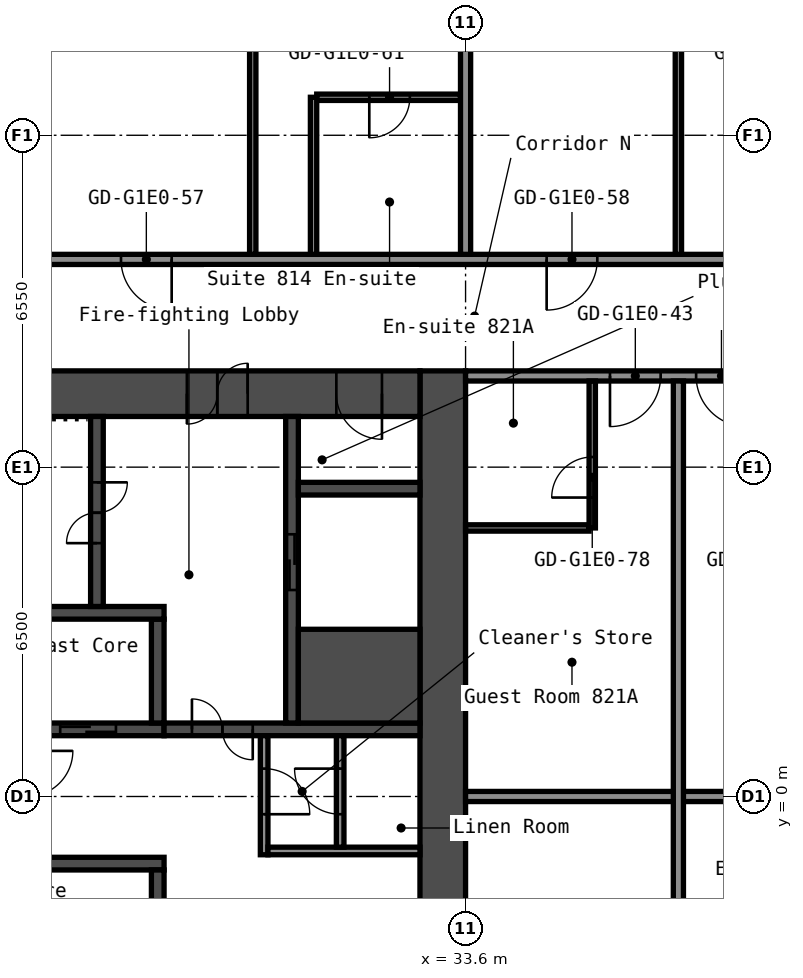
"""IFC4 building model, lengths in metres.
Left out: names, types, materials, properties, quantities, classifications, styles, units other than length and angle.
Written with IfcOpenShell. Run it as: python <this file> out.ifc"""

import sys

from ifc_helpers import new_model, si_unit, direction, frame, frame_2d, origin, place, context, subcontext, project, spatial, rectangle, extrude, element, fill, save


model = new_model("IFC4")
c1 = context("Model", 3, precision=1e-05, world=origin(), true_north=direction((0.0, 1.0)))
c2 = subcontext(c1, "Body", "Model", "MODEL_VIEW")
j1 = project(units=[si_unit("LENGTHUNIT", "METRE"), si_unit("PLANEANGLEUNIT", "RADIAN")], contexts=[c1])
p1 = place(None, origin())
s1 = spatial("IfcSite", under=j1, at=p1, CompositionType="ELEMENT")
p2 = place(p1, origin())
s2 = spatial("IfcBuilding", under=s1, at=p2, CompositionType="ELEMENT")
p3 = place(p2, frame((0.0, 0.0, 32.6)))
s3 = spatial("IfcBuildingStorey", under=s2, at=p3, CompositionType="ELEMENT", Elevation=32.6)
p4 = place(p3, frame((33.15, -8.4, 0.0), z_axis=(0.0, 0.0, 1.0), x_axis=(0.0, 1.0, 0.0)))
e1 = element("IfcWall", 1, at=p4, inside=s3, PredefinedType="SHEAR", context=c2, shape_type="SweptSolid", body=[
    extrude(rectangle(XDim=16.8, YDim=0.9, at=frame_2d((8.4, 0.0))), origin(), (0.0, 0.0, 1.0), 2.8),
])
p5 = place(p3, frame((17.7, 7.95, 0.0), z_axis=(0.0, 0.0, 1.0), x_axis=(1.0, 0.0, 0.0)))
e2 = element("IfcWall", 2, at=p5, inside=s3, PredefinedType="SHEAR", context=c2, shape_type="SweptSolid", body=[
    extrude(rectangle(XDim=15.0, YDim=0.9, at=frame_2d((7.5, 0.0))), origin(), (0.0, 0.0, 1.0), 2.8),
])
p6 = place(p5, frame((10.4, 0.0, 0.0)))
e3 = element("IfcOpeningElement", 3, at=p6, cuts=e2, PredefinedType="OPENING", context=c2, shape_type="SweptSolid", body=[
    extrude(rectangle(XDim=1.2, YDim=2.1, at=frame_2d((0.6, 1.05))), frame((0.0, 0.46, 0.0), z_axis=(0.0, -1.0, 0.0), x_axis=(1.0, 0.0, 0.0)), (0.0, 0.0, 1.0), 0.92),
])
p7 = place(p5, frame((13.35, 0.0, 0.0)))
e4 = element("IfcOpeningElement", 4, at=p7, cuts=e2, PredefinedType="OPENING", context=c2, shape_type="SweptSolid", body=[
    extrude(rectangle(XDim=0.9, YDim=2.1, at=frame_2d((0.45, 1.05))), frame((0.0, 0.46, 0.0), z_axis=(0.0, -1.0, 0.0), x_axis=(1.0, 0.0, 0.0)), (0.0, 0.0, 1.0), 0.92),
])
p8 = place(p3, frame((20.15, 1.325, 0.0), z_axis=(0.0, 0.0, 1.0), x_axis=(1.0, 0.0, 0.0)))
e5 = element("IfcWall", 5, at=p8, inside=s3, PredefinedType="SHEAR", context=c2, shape_type="SweptSolid", body=[
    extrude(rectangle(XDim=7.5, YDim=0.25, at=frame_2d((3.75, 0.0))), origin(), (0.0, 0.0, 1.0), 2.8),
])
p9 = place(p8, frame((0.65, 0.0, 0.0)))
e6 = element("IfcOpeningElement", 6, at=p9, cuts=e5, PredefinedType="OPENING", context=c2, shape_type="SweptSolid", body=[
    extrude(rectangle(XDim=1.1, YDim=2.1, at=frame_2d((0.55, 1.05))), frame((0.0, 0.135, 0.0), z_axis=(0.0, -1.0, 0.0), x_axis=(1.0, 0.0, 0.0)), (0.0, 0.0, 1.0), 0.27),
])
p10 = place(p8, frame((3.05, 0.0, 0.0)))
e7 = element("IfcOpeningElement", 7, at=p10, cuts=e5, PredefinedType="OPENING", context=c2, shape_type="SweptSolid", body=[
    extrude(rectangle(XDim=1.1, YDim=2.1, at=frame_2d((0.55, 1.05))), frame((0.0, 0.135, 0.0), z_axis=(0.0, -1.0, 0.0), x_axis=(1.0, 0.0, 0.0)), (0.0, 0.0, 1.0), 0.27),
])
p11 = place(p8, frame((5.45, 0.0, 0.0)))
e8 = element("IfcOpeningElement", 8, at=p11, cuts=e5, PredefinedType="OPENING", context=c2, shape_type="SweptSolid", body=[
    extrude(rectangle(XDim=1.1, YDim=2.1, at=frame_2d((0.55, 1.05))), frame((0.0, 0.135, 0.0), z_axis=(0.0, -1.0, 0.0), x_axis=(1.0, 0.0, 0.0)), (0.0, 0.0, 1.0), 0.27),
])
p12 = place(p3, frame((27.525, 1.45, 0.0), z_axis=(0.0, 0.0, 1.0), x_axis=(0.0, 1.0, 0.0)))
e9 = element("IfcWall", 9, at=p12, inside=s3, PredefinedType="SHEAR", context=c2, shape_type="SweptSolid", body=[
    extrude(rectangle(XDim=2.05, YDim=0.25, at=frame_2d((1.025, 0.0))), origin(), (0.0, 0.0, 1.0), 2.8),
])
p13 = place(p3, frame((20.15, 3.625, 0.0), z_axis=(0.0, 0.0, 1.0), x_axis=(1.0, 0.0, 0.0)))
e10 = element("IfcWall", 10, at=p13, inside=s3, PredefinedType="SHEAR", context=c2, shape_type="SweptSolid", body=[
    extrude(rectangle(XDim=7.5, YDim=0.25, at=frame_2d((3.75, 0.0))), origin(), (0.0, 0.0, 1.0), 2.8),
])
p14 = place(p3, frame((26.325, 3.75, 0.0), z_axis=(0.0, 0.0, 1.0), x_axis=(0.0, 1.0, 0.0)))
e11 = element("IfcWall", 11, at=p14, inside=s3, PredefinedType="SHEAR", context=c2, shape_type="SweptSolid", body=[
    extrude(rectangle(XDim=3.75, YDim=0.25, at=frame_2d((1.875, 0.0))), origin(), (0.0, 0.0, 1.0), 2.8),
])
p15 = place(p14, frame((1.25, 0.0, 0.0)))
e12 = element("IfcOpeningElement", 12, at=p15, cuts=e11, PredefinedType="OPENING", context=c2, shape_type="SweptSolid", body=[
    extrude(rectangle(XDim=1.2, YDim=2.1, at=frame_2d((0.6, 1.05))), frame((0.0, 0.135, 0.0), z_axis=(0.0, -1.0, 0.0), x_axis=(1.0, 0.0, 0.0)), (0.0, 0.0, 1.0), 0.27),
])
p16 = place(p3, frame((27.65, 1.325, 0.0), z_axis=(0.0, 0.0, 1.0), x_axis=(1.0, 0.0, 0.0)))
e13 = element("IfcWall", 13, at=p16, inside=s3, PredefinedType="SHEAR", context=c2, shape_type="SweptSolid", body=[
    extrude(rectangle(XDim=5.05, YDim=0.25, at=frame_2d((2.525, 0.0))), origin(), (0.0, 0.0, 1.0), 2.8),
])
p17 = place(p16, frame((0.55, 0.0, 0.0)))
e14 = element("IfcOpeningElement", 14, at=p17, cuts=e13, PredefinedType="OPENING", context=c2, shape_type="SweptSolid", body=[
    extrude(rectangle(XDim=1.2, YDim=2.1, at=frame_2d((0.6, 1.05))), frame((0.0, 0.135, 0.0), z_axis=(0.0, -1.0, 0.0), x_axis=(1.0, 0.0, 0.0)), (0.0, 0.0, 1.0), 0.27),
])
p18 = place(p3, frame((30.175, 1.45, 0.0), z_axis=(0.0, 0.0, 1.0), x_axis=(0.0, 1.0, 0.0)))
e15 = element("IfcWall", 15, at=p18, inside=s3, PredefinedType="SHEAR", context=c2, shape_type="SweptSolid", body=[
    extrude(rectangle(XDim=6.05, YDim=0.25, at=frame_2d((3.025, 0.0))), origin(), (0.0, 0.0, 1.0), 2.8),
])
p19 = place(p18, frame((2.625, 0.0, 0.0)))
e16 = element("IfcOpeningElement", 16, at=p19, cuts=e15, PredefinedType="OPENING", context=c2, shape_type="SweptSolid", body=[
    extrude(rectangle(XDim=1.1, YDim=2.1, at=frame_2d((0.55, 1.05))), frame((0.0, 0.135, 0.0), z_axis=(0.0, -1.0, 0.0), x_axis=(1.0, 0.0, 0.0)), (0.0, 0.0, 1.0), 0.27),
])
p20 = place(p3, frame((30.3, 2.375, 0.0), z_axis=(0.0, 0.0, 1.0), x_axis=(1.0, 0.0, 0.0)))
e17 = element("IfcWall", 17, at=p20, inside=s3, PredefinedType="SHEAR", context=c2, shape_type="SweptSolid", body=[
    extrude(rectangle(XDim=2.4, YDim=1.85, at=frame_2d((1.2, 0.0))), origin(), (0.0, 0.0, 1.0), 2.8),
])
p21 = place(p3, frame((30.3, 6.075, 0.0), z_axis=(0.0, 0.0, 1.0), x_axis=(1.0, 0.0, 0.0)))
e18 = element("IfcWall", 18, at=p21, inside=s3, PredefinedType="SHEAR", context=c2, shape_type="SweptSolid", body=[
    extrude(rectangle(XDim=2.4, YDim=0.25, at=frame_2d((1.2, 0.0))), origin(), (0.0, 0.0, 1.0), 2.8),
])
p22 = place(p3, frame((20.15, -1.325, 0.0), z_axis=(0.0, 0.0, 1.0), x_axis=(1.0, 0.0, 0.0)))
e19 = element("IfcWall", 19, at=p22, inside=s3, PredefinedType="SHEAR", context=c2, shape_type="SweptSolid", body=[
    extrude(rectangle(XDim=7.5, YDim=0.25, at=frame_2d((3.75, 0.0))), origin(), (0.0, 0.0, 1.0), 2.8),
])
p23 = place(p3, frame((27.525, -3.5, 0.0), z_axis=(0.0, 0.0, 1.0), x_axis=(0.0, 1.0, 0.0)))
e20 = element("IfcWall", 20, at=p23, inside=s3, PredefinedType="SHEAR", context=c2, shape_type="SweptSolid", body=[
    extrude(rectangle(XDim=2.05, YDim=0.25, at=frame_2d((1.025, 0.0))), origin(), (0.0, 0.0, 1.0), 2.8),
])
p24 = place(p3, frame((29.625, -1.15, 0.0), z_axis=(0.0, 0.0, 1.0), x_axis=(0.0, 1.0, 0.0)))
e21 = element("IfcWall", 21, at=p24, inside=s3, PredefinedType="PARTITIONING", context=c2, shape_type="SweptSolid", body=[
    extrude(rectangle(XDim=2.35, YDim=0.15, at=frame_2d((1.175, 0.0))), origin(), (0.0, 0.0, 1.0), 2.8),
])
p25 = place(p24, frame((0.8, 0.0, 0.0)))
e22 = element("IfcOpeningElement", 22, at=p25, cuts=e21, PredefinedType="OPENING", context=c2, shape_type="SweptSolid", body=[
    extrude(rectangle(XDim=0.9, YDim=2.1, at=frame_2d((0.45, 1.05))), frame((0.0, 0.085, 0.0), z_axis=(0.0, -1.0, 0.0), x_axis=(1.0, 0.0, 0.0)), (0.0, 0.0, 1.0), 0.17),
])
p26 = place(p3, frame((29.7, -1.075, 0.0), z_axis=(0.0, 0.0, 1.0), x_axis=(1.0, 0.0, 0.0)))
e23 = element("IfcWall", 23, at=p26, inside=s3, PredefinedType="PARTITIONING", context=c2, shape_type="SweptSolid", body=[
    extrude(rectangle(XDim=3.0, YDim=0.15, at=frame_2d((1.5, 0.0))), origin(), (0.0, 0.0, 1.0), 2.8),
])
p27 = place(p3, frame((31.125, -1.0, 0.0), z_axis=(0.0, 0.0, 1.0), x_axis=(0.0, 1.0, 0.0)))
e24 = element("IfcWall", 24, at=p27, inside=s3, PredefinedType="PARTITIONING", context=c2, shape_type="SweptSolid", body=[
    extrude(rectangle(XDim=2.2, YDim=0.15, at=frame_2d((1.1, 0.0))), origin(), (0.0, 0.0, 1.0), 2.8),
])
p28 = place(p27, frame((0.65, 0.0, 0.0)))
e25 = element("IfcOpeningElement", 25, at=p28, cuts=e24, PredefinedType="OPENING", context=c2, shape_type="SweptSolid", body=[
    extrude(rectangle(XDim=0.9, YDim=2.1, at=frame_2d((0.45, 1.05))), frame((0.0, 0.085, 0.0), z_axis=(0.0, -1.0, 0.0), x_axis=(1.0, 0.0, 0.0)), (0.0, 0.0, 1.0), 0.17),
])
p29 = place(p3, frame((33.6, 0.0, 0.0), z_axis=(0.0, 0.0, 1.0), x_axis=(1.0, 0.0, 0.0)))
e26 = element("IfcWall", 26, at=p29, inside=s3, PredefinedType="PARTITIONING", context=c2, shape_type="SweptSolid", body=[
    extrude(rectangle(XDim=14.9, YDim=0.2, at=frame_2d((7.45, 0.0))), origin(), (0.0, 0.0, 1.0), 2.8),
])
p30 = place(p3, frame((33.6, 5.3, 0.0), z_axis=(0.0, 0.0, 1.0), x_axis=(1.0, 0.0, 0.0)))
e27 = element("IfcWall", 27, at=p30, inside=s3, PredefinedType="PARTITIONING", context=c2, shape_type="SweptSolid", body=[
    extrude(rectangle(XDim=2.438, YDim=0.125, at=frame_2d((1.219, 0.0))), origin(), (0.0, 0.0, 1.0), 2.8),
])
p31 = place(p3, frame((33.6, 8.3, 0.0), z_axis=(0.0, 0.0, 1.0), x_axis=(1.0, 0.0, 0.0)))
e28 = element("IfcWall", 28, at=p31, inside=s3, PredefinedType="PARTITIONING", context=c2, shape_type="SweptSolid", body=[
    extrude(rectangle(XDim=15.0, YDim=0.2, at=frame_2d((7.5, 0.0))), origin(), (0.0, 0.0, 1.0), 2.8),
])
p32 = place(p31, frame((2.85, 0.0, 0.0)))
e29 = element("IfcOpeningElement", 29, at=p32, cuts=e28, PredefinedType="OPENING", context=c2, shape_type="SweptSolid", body=[
    extrude(rectangle(XDim=1.0, YDim=2.1, at=frame_2d((0.5, 1.05))), frame((0.0, 0.11, 0.0), z_axis=(0.0, -1.0, 0.0), x_axis=(1.0, 0.0, 0.0)), (0.0, 0.0, 1.0), 0.22),
])
p33 = place(p31, frame((4.55, 0.0, 0.0)))
e30 = element("IfcOpeningElement", 30, at=p33, cuts=e28, PredefinedType="OPENING", context=c2, shape_type="SweptSolid", body=[
    extrude(rectangle(XDim=1.0, YDim=2.1, at=frame_2d((0.5, 1.05))), frame((0.0, 0.11, 0.0), z_axis=(0.0, -1.0, 0.0), x_axis=(1.0, 0.0, 0.0)), (0.0, 0.0, 1.0), 0.22),
])
p34 = place(p31, frame((12.9, 0.0, 0.0)))
e31 = element("IfcOpeningElement", 31, at=p34, cuts=e28, PredefinedType="OPENING", context=c2, shape_type="SweptSolid", body=[
    extrude(rectangle(XDim=1.0, YDim=2.1, at=frame_2d((0.5, 1.05))), frame((0.0, 0.11, 0.0), z_axis=(0.0, -1.0, 0.0), x_axis=(1.0, 0.0, 0.0)), (0.0, 0.0, 1.0), 0.22),
])
p35 = place(p3, frame((16.8, 10.6, 0.0), z_axis=(0.0, 0.0, 1.0), x_axis=(1.0, 0.0, 0.0)))
e32 = element("IfcWall", 32, at=p35, inside=s3, PredefinedType="PARTITIONING", context=c2, shape_type="SweptSolid", body=[
    extrude(rectangle(XDim=34.3, YDim=0.2, at=frame_2d((17.15, 0.0))), origin(), (0.0, 0.0, 1.0), 2.8),
])
p36 = place(p35, frame((1.6, 0.0, 0.0)))
e33 = element("IfcOpeningElement", 33, at=p36, cuts=e32, PredefinedType="OPENING", context=c2, shape_type="SweptSolid", body=[
    extrude(rectangle(XDim=1.0, YDim=2.1, at=frame_2d((0.5, 1.05))), frame((0.0, 0.11, 0.0), z_axis=(0.0, -1.0, 0.0), x_axis=(1.0, 0.0, 0.0)), (0.0, 0.0, 1.0), 0.22),
])
p37 = place(p35, frame((10.0, 0.0, 0.0)))
e34 = element("IfcOpeningElement", 34, at=p37, cuts=e32, PredefinedType="OPENING", context=c2, shape_type="SweptSolid", body=[
    extrude(rectangle(XDim=1.0, YDim=2.1, at=frame_2d((0.5, 1.05))), frame((0.0, 0.11, 0.0), z_axis=(0.0, -1.0, 0.0), x_axis=(1.0, 0.0, 0.0)), (0.0, 0.0, 1.0), 0.22),
])
p38 = place(p35, frame((18.4, 0.0, 0.0)))
e35 = element("IfcOpeningElement", 35, at=p38, cuts=e32, PredefinedType="OPENING", context=c2, shape_type="SweptSolid", body=[
    extrude(rectangle(XDim=1.0, YDim=2.1, at=frame_2d((0.5, 1.05))), frame((0.0, 0.11, 0.0), z_axis=(0.0, -1.0, 0.0), x_axis=(1.0, 0.0, 0.0)), (0.0, 0.0, 1.0), 0.22),
])
p39 = place(p35, frame((26.9, 0.0, 0.0)))
e36 = element("IfcOpeningElement", 36, at=p39, cuts=e32, PredefinedType="OPENING", context=c2, shape_type="SweptSolid", body=[
    extrude(rectangle(XDim=1.0, YDim=2.1, at=frame_2d((0.5, 1.05))), frame((0.0, 0.11, 0.0), z_axis=(0.0, -1.0, 0.0), x_axis=(1.0, 0.0, 0.0)), (0.0, 0.0, 1.0), 0.22),
])
p40 = place(p3, frame((30.663, 13.8, 0.0), z_axis=(0.0, 0.0, 1.0), x_axis=(1.0, 0.0, 0.0)))
e37 = element("IfcWall", 37, at=p40, inside=s3, PredefinedType="PARTITIONING", context=c2, shape_type="SweptSolid", body=[
    extrude(rectangle(XDim=2.837, YDim=0.125, at=frame_2d((1.419, 0.0))), origin(), (0.0, 0.0, 1.0), 2.8),
])
p41 = place(p40, frame((1.038, 0.0, 0.0)))
e38 = element("IfcOpeningElement", 38, at=p41, cuts=e37, PredefinedType="OPENING", context=c2, shape_type="SweptSolid", body=[
    extrude(rectangle(XDim=0.8, YDim=2.1, at=frame_2d((0.4, 1.05))), frame((0.0, 0.073, 0.0), z_axis=(0.0, -1.0, 0.0), x_axis=(1.0, 0.0, 0.0)), (0.0, 0.0, 1.0), 0.145),
])
p42 = place(p3, frame((29.4, 10.7, 0.0), z_axis=(0.0, 0.0, 1.0), x_axis=(0.0, 1.0, 0.0)))
e39 = element("IfcWall", 39, at=p42, inside=s3, PredefinedType="PARTITIONING", context=c2, shape_type="SweptSolid", body=[
    extrude(rectangle(XDim=9.6, YDim=0.125, at=frame_2d((4.8, 0.0))), origin(), (0.0, 0.0, 1.0), 2.8),
])
p43 = place(p42, frame((4.05, 0.0, 0.0)))
e40 = element("IfcOpeningElement", 40, at=p43, cuts=e39, PredefinedType="OPENING", context=c2, shape_type="SweptSolid", body=[
    extrude(rectangle(XDim=0.9, YDim=2.1, at=frame_2d((0.45, 1.05))), frame((0.0, 0.073, 0.0), z_axis=(0.0, -1.0, 0.0), x_axis=(1.0, 0.0, 0.0)), (0.0, 0.0, 1.0), 0.145),
])
p44 = place(p3, frame((30.6, 10.7, 0.0), z_axis=(0.0, 0.0, 1.0), x_axis=(0.0, 1.0, 0.0)))
e41 = element("IfcWall", 41, at=p44, inside=s3, PredefinedType="PARTITIONING", context=c2, shape_type="SweptSolid", body=[
    extrude(rectangle(XDim=3.1, YDim=0.125, at=frame_2d((1.55, 0.0))), origin(), (0.0, 0.0, 1.0), 2.8),
])
p45 = place(p3, frame((33.6, 10.7, 0.0), z_axis=(0.0, 0.0, 1.0), x_axis=(0.0, 1.0, 0.0)))
e42 = element("IfcWall", 42, at=p45, inside=s3, PredefinedType="PARTITIONING", context=c2, shape_type="SweptSolid", body=[
    extrude(rectangle(XDim=9.6, YDim=0.2, at=frame_2d((4.8, 0.0))), origin(), (0.0, 0.0, 1.0), 2.8),
])
p46 = place(p3, frame((36.1, 5.3, 0.0), z_axis=(0.0, 0.0, 1.0), x_axis=(0.0, 1.0, 0.0)))
e43 = element("IfcWall", 43, at=p46, inside=s3, PredefinedType="PARTITIONING", context=c2, shape_type="SweptSolid", body=[
    extrude(rectangle(XDim=2.9, YDim=0.125, at=frame_2d((1.45, 0.0))), origin(), (0.0, 0.0, 1.0), 2.8),
])
p47 = place(p46, frame((0.6, 0.0, 0.0)))
e44 = element("IfcOpeningElement", 44, at=p47, cuts=e43, PredefinedType="OPENING", context=c2, shape_type="SweptSolid", body=[
    extrude(rectangle(XDim=0.8, YDim=2.1, at=frame_2d((0.4, 1.05))), frame((0.0, 0.073, 0.0), z_axis=(0.0, -1.0, 0.0), x_axis=(1.0, 0.0, 0.0)), (0.0, 0.0, 1.0), 0.145),
])
p48 = place(p3, frame((37.8, -8.2, 0.0), z_axis=(0.0, 0.0, 1.0), x_axis=(0.0, 1.0, 0.0)))
e45 = element("IfcWall", 45, at=p48, inside=s3, PredefinedType="PARTITIONING", context=c2, shape_type="SweptSolid", body=[
    extrude(rectangle(XDim=16.4, YDim=0.2, at=frame_2d((8.2, 0.0))), origin(), (0.0, 0.0, 1.0), 2.8),
])
p49 = place(p3, frame((37.8, 10.7, 0.0), z_axis=(0.0, 0.0, 1.0), x_axis=(0.0, 1.0, 0.0)))
e46 = element("IfcWall", 46, at=p49, inside=s3, PredefinedType="PARTITIONING", context=c2, shape_type="SweptSolid", body=[
    extrude(rectangle(XDim=9.6, YDim=0.125, at=frame_2d((4.8, 0.0))), origin(), (0.0, 0.0, 1.0), 2.8),
])
p50 = place(p49, frame((4.05, 0.0, 0.0)))
e47 = element("IfcOpeningElement", 47, at=p50, cuts=e46, PredefinedType="OPENING", context=c2, shape_type="SweptSolid", body=[
    extrude(rectangle(XDim=0.9, YDim=2.1, at=frame_2d((0.45, 1.05))), frame((0.0, 0.073, 0.0), z_axis=(0.0, -1.0, 0.0), x_axis=(1.0, 0.0, 0.0)), (0.0, 0.0, 1.0), 0.145),
])
p51 = place(p6, origin())
e48 = element("IfcDoor", 48, at=p51, inside=s3, OperationType="DOUBLE_DOOR_SINGLE_SWING", PredefinedType="DOOR", context=c2, shape_type="SweptSolid", body=[
    extrude(rectangle(XDim=1.2, YDim=2.1, at=frame_2d((0.6, 1.05))), frame((0.0, 0.025, 0.0), z_axis=(0.0, -1.0, 0.0), x_axis=(1.0, 0.0, 0.0)), (0.0, 0.0, 1.0), 0.05),
])
fill(e3, e48)
p52 = place(p7, origin())
e49 = element("IfcDoor", 49, at=p52, inside=s3, OperationType="SINGLE_SWING_RIGHT", PredefinedType="DOOR", context=c2, shape_type="SweptSolid", body=[
    extrude(rectangle(XDim=0.9, YDim=2.1, at=frame_2d((0.45, 1.05))), frame((0.0, 0.025, 0.0), z_axis=(0.0, -1.0, 0.0), x_axis=(1.0, 0.0, 0.0)), (0.0, 0.0, 1.0), 0.05),
])
fill(e4, e49)
p53 = place(p15, origin())
e50 = element("IfcDoor", 50, at=p53, inside=s3, OperationType="DOUBLE_DOOR_SINGLE_SWING", PredefinedType="DOOR", context=c2, shape_type="SweptSolid", body=[
    extrude(rectangle(XDim=1.2, YDim=2.1, at=frame_2d((0.6, 1.05))), frame((0.0, 0.025, 0.0), z_axis=(0.0, -1.0, 0.0), x_axis=(1.0, 0.0, 0.0)), (0.0, 0.0, 1.0), 0.05),
])
fill(e12, e50)
p54 = place(p17, origin())
e51 = element("IfcDoor", 51, at=p54, inside=s3, OperationType="DOUBLE_DOOR_SINGLE_SWING", PredefinedType="DOOR", context=c2, shape_type="SweptSolid", body=[
    extrude(rectangle(XDim=1.2, YDim=2.1, at=frame_2d((0.6, 1.05))), frame((0.0, 0.025, 0.0), z_axis=(0.0, -1.0, 0.0), x_axis=(1.0, 0.0, 0.0)), (0.0, 0.0, 1.0), 0.05),
])
fill(e14, e51)
p55 = place(p25, origin())
e52 = element("IfcDoor", 52, at=p55, inside=s3, OperationType="SINGLE_SWING_LEFT", PredefinedType="DOOR", context=c2, shape_type="SweptSolid", body=[
    extrude(rectangle(XDim=0.9, YDim=2.1, at=frame_2d((0.45, 1.05))), frame((0.0, 0.025, 0.0), z_axis=(0.0, -1.0, 0.0), x_axis=(1.0, 0.0, 0.0)), (0.0, 0.0, 1.0), 0.05),
])
fill(e22, e52)
p56 = place(p28, origin())
e53 = element("IfcDoor", 53, at=p56, inside=s3, OperationType="SINGLE_SWING_LEFT", PredefinedType="DOOR", context=c2, shape_type="SweptSolid", body=[
    extrude(rectangle(XDim=0.9, YDim=2.1, at=frame_2d((0.45, 1.05))), frame((0.0, 0.025, 0.0), z_axis=(0.0, -1.0, 0.0), x_axis=(1.0, 0.0, 0.0)), (0.0, 0.0, 1.0), 0.05),
])
fill(e25, e53)
p57 = place(p11, origin())
e54 = element("IfcDoor", 54, at=p57, inside=s3, OperationType="DOUBLE_DOOR_SLIDING", PredefinedType="DOOR", context=c2, shape_type="SweptSolid", body=[
    extrude(rectangle(XDim=1.1, YDim=2.1, at=frame_2d((0.55, 1.05))), frame((0.0, 0.025, 0.0), z_axis=(0.0, -1.0, 0.0), x_axis=(1.0, 0.0, 0.0)), (0.0, 0.0, 1.0), 0.05),
])
fill(e8, e54)
p58 = place(p19, origin())
e55 = element("IfcDoor", 55, at=p58, inside=s3, OperationType="DOUBLE_DOOR_SLIDING", PredefinedType="DOOR", context=c2, shape_type="SweptSolid", body=[
    extrude(rectangle(XDim=1.1, YDim=2.1, at=frame_2d((0.55, 1.05))), frame((0.0, 0.025, 0.0), z_axis=(0.0, -1.0, 0.0), x_axis=(1.0, 0.0, 0.0)), (0.0, 0.0, 1.0), 0.05),
])
fill(e16, e55)
p59 = place(p32, origin())
e56 = element("IfcDoor", 56, at=p59, inside=s3, OperationType="SINGLE_SWING_LEFT", PredefinedType="DOOR", context=c2, shape_type="SweptSolid", body=[
    extrude(rectangle(XDim=1.0, YDim=2.1, at=frame_2d((0.5, 1.05))), frame((0.0, 0.025, 0.0), z_axis=(0.0, -1.0, 0.0), x_axis=(1.0, 0.0, 0.0)), (0.0, 0.0, 1.0), 0.05),
])
fill(e29, e56)
p60 = place(p33, origin())
e57 = element("IfcDoor", 57, at=p60, inside=s3, OperationType="SINGLE_SWING_RIGHT", PredefinedType="DOOR", context=c2, shape_type="SweptSolid", body=[
    extrude(rectangle(XDim=1.0, YDim=2.1, at=frame_2d((0.5, 1.05))), frame((0.0, 0.025, 0.0), z_axis=(0.0, -1.0, 0.0), x_axis=(1.0, 0.0, 0.0)), (0.0, 0.0, 1.0), 0.05),
])
fill(e30, e57)
p61 = place(p37, origin())
e58 = element("IfcDoor", 58, at=p61, inside=s3, OperationType="SINGLE_SWING_RIGHT", PredefinedType="DOOR", context=c2, shape_type="SweptSolid", body=[
    extrude(rectangle(XDim=1.0, YDim=2.1, at=frame_2d((0.5, 1.05))), frame((0.0, 0.025, 0.0), z_axis=(0.0, -1.0, 0.0), x_axis=(1.0, 0.0, 0.0)), (0.0, 0.0, 1.0), 0.05),
])
fill(e34, e58)
p62 = place(p38, origin())
e59 = element("IfcDoor", 59, at=p62, inside=s3, OperationType="SINGLE_SWING_LEFT", PredefinedType="DOOR", context=c2, shape_type="SweptSolid", body=[
    extrude(rectangle(XDim=1.0, YDim=2.1, at=frame_2d((0.5, 1.05))), frame((0.0, 0.025, 0.0), z_axis=(0.0, -1.0, 0.0), x_axis=(1.0, 0.0, 0.0)), (0.0, 0.0, 1.0), 0.05),
])
fill(e35, e59)
p63 = place(p41, origin())
e60 = element("IfcDoor", 60, at=p63, inside=s3, OperationType="SINGLE_SWING_LEFT", PredefinedType="DOOR", context=c2, shape_type="SweptSolid", body=[
    extrude(rectangle(XDim=0.8, YDim=2.1, at=frame_2d((0.4, 1.05))), frame((0.0, 0.025, 0.0), z_axis=(0.0, -1.0, 0.0), x_axis=(1.0, 0.0, 0.0)), (0.0, 0.0, 1.0), 0.05),
])
fill(e38, e60)
p64 = place(p47, origin())
e61 = element("IfcDoor", 61, at=p64, inside=s3, OperationType="SINGLE_SWING_RIGHT", PredefinedType="DOOR", context=c2, shape_type="SweptSolid", body=[
    extrude(rectangle(XDim=0.8, YDim=2.1, at=frame_2d((0.4, 1.05))), frame((0.0, 0.025, 0.0), z_axis=(0.0, -1.0, 0.0), x_axis=(1.0, 0.0, 0.0)), (0.0, 0.0, 1.0), 0.05),
])
fill(e44, e61)
save(model, sys.argv[1])
